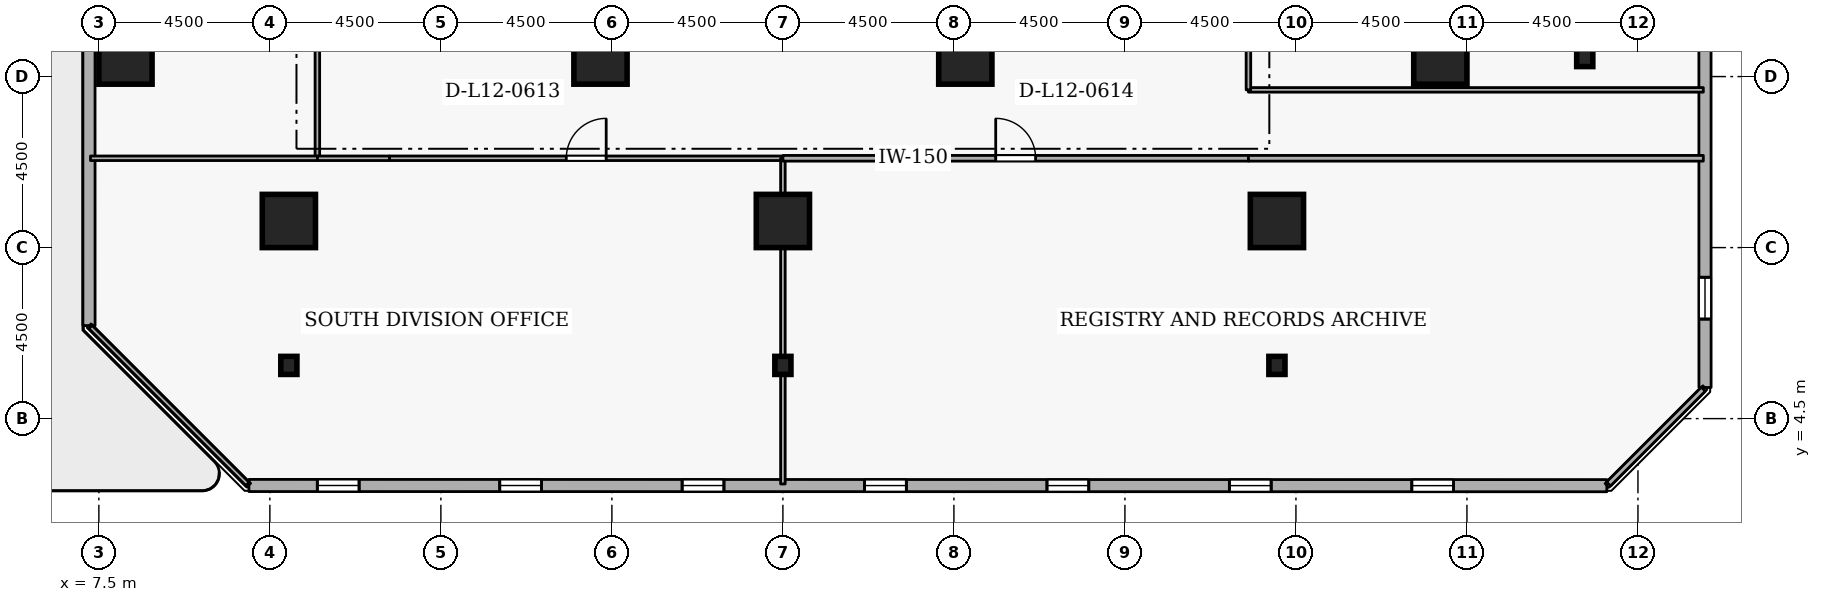
"""IFC4 building model, lengths in metres.
Left out: names, types, materials, properties, quantities, classifications, styles, units other than length and angle.
Written with IfcOpenShell. Run it as: python <this file> out.ifc"""

import sys

from ifc_helpers import new_model, si_unit, direction, frame, frame_2d, origin, origin_2d, place, context, subcontext, project, spatial, rectangle, i_section, extrude, element, fill, save


model = new_model("IFC4")
c1 = context("Model", 3, precision=1e-05, world=origin(), true_north=direction((0.0, 1.0)))
c2 = subcontext(c1, "Body", "Model", "MODEL_VIEW")
j1 = project(units=[si_unit("LENGTHUNIT", "METRE"), si_unit("PLANEANGLEUNIT", "RADIAN")], contexts=[c1])
p1 = place(None, origin())
s1 = spatial("IfcSite", under=j1, at=p1, CompositionType="ELEMENT")
p2 = place(p1, origin())
s2 = spatial("IfcBuilding", under=s1, at=p2, CompositionType="ELEMENT")
p3 = place(p2, frame((0.0, 0.0, 49.5)))
s3 = spatial("IfcBuildingStorey", under=s2, at=p3, CompositionType="ELEMENT", Elevation=49.5)
for number, where, z_axis, x_axis in (
    (1, (12.5, 9.7, 0.0), (0.0, 0.0, 1.0), (1.0, 0.0, 0.0)),
    (2, (25.5, 9.7, 0.0), (0.0, 0.0, 1.0), (1.0, 0.0, 0.0)),
    (3, (38.5, 9.7, 0.0), (0.0, 0.0, 1.0), (1.0, 0.0, 0.0)),
    (4, (42.8, 14.0, 0.0), (0.0, 0.0, 1.0), (1.0, 0.0, 0.0)),
    (5, (8.2, 14.0, 0.0), (0.0, 0.0, 1.0), (1.0, 0.0, 0.0)),
    (6, (20.7, 14.0, 0.0), (0.0, 0.0, 1.0), (1.0, 0.0, 0.0)),
    (7, (30.3, 14.0, 0.0), (0.0, 0.0, 1.0), (1.0, 0.0, 0.0)),
):
    element("IfcColumn", number, at=place(p3, frame(where, z_axis=z_axis, x_axis=x_axis)), inside=s3, PredefinedType="COLUMN", context=c2, shape_type="SweptSolid", body=[
        extrude(rectangle(XDim=1.4, YDim=1.4, at=origin_2d()), origin(), (0.0, 0.0, 1.0), 4.2),
    ])
for number, where, z_axis, x_axis in (
    (8, (12.5, 5.9, 0.0), (0.0, 0.0, 1.0), (1.0, 0.0, 0.0)),
    (9, (25.5, 5.9, 0.0), (0.0, 0.0, 1.0), (1.0, 0.0, 0.0)),
    (10, (38.5, 5.9, 0.0), (0.0, 0.0, 1.0), (1.0, 0.0, 0.0)),
    (11, (46.6, 14.0, 0.0), (0.0, 0.0, 1.0), (1.0, 0.0, 0.0)),
):
    element("IfcColumn", number, at=place(p3, frame(where, z_axis=z_axis, x_axis=x_axis)), inside=s3, PredefinedType="COLUMN", context=c2, shape_type="SweptSolid", body=[
        extrude(i_section(OverallWidth=0.424, OverallDepth=0.475, WebThickness=0.048, FlangeThickness=0.077, FilletRadius=0.015, at=origin_2d()), origin(), (0.0, 0.0, 1.0), 4.2),
    ])
p4 = place(p3, frame((11.448, 2.74, 0.0), z_axis=(0.0, 0.0, 1.0), x_axis=(0.999999988703, -0.000150313265, 0.0)))
e12 = element("IfcWall", 12, at=p4, inside=s3, PredefinedType="STANDARD", context=c2, shape_type="SweptSolid", body=[
    extrude(rectangle(XDim=35.733, YDim=0.32, at=frame_2d((17.866, 0.0))), origin(), (0.0, 0.0, 1.0), 3.3),
])
p5 = place(p4, frame((1.8, 0.0, 0.72)))
e13 = element("IfcOpeningElement", 13, at=p5, cuts=e12, PredefinedType="OPENING", context=c2, shape_type="SweptSolid", body=[
    extrude(rectangle(XDim=1.1, YDim=1.8, at=frame_2d((0.55, 0.9))), frame((0.0, 0.17, 0.0), z_axis=(0.0, -1.0, 0.0), x_axis=(1.0, 0.0, 0.0)), (0.0, 0.0, 1.0), 0.34),
])
p6 = place(p4, frame((6.6, 0.0, 0.72)))
e14 = element("IfcOpeningElement", 14, at=p6, cuts=e12, PredefinedType="OPENING", context=c2, shape_type="SweptSolid", body=[
    extrude(rectangle(XDim=1.1, YDim=1.8, at=frame_2d((0.55, 0.9))), frame((0.0, 0.17, 0.0), z_axis=(0.0, -1.0, 0.0), x_axis=(1.0, 0.0, 0.0)), (0.0, 0.0, 1.0), 0.34),
])
p7 = place(p4, frame((11.4, 0.0, 0.72)))
e15 = element("IfcOpeningElement", 15, at=p7, cuts=e12, PredefinedType="OPENING", context=c2, shape_type="SweptSolid", body=[
    extrude(rectangle(XDim=1.1, YDim=1.8, at=frame_2d((0.55, 0.9))), frame((0.0, 0.17, 0.0), z_axis=(0.0, -1.0, 0.0), x_axis=(1.0, 0.0, 0.0)), (0.0, 0.0, 1.0), 0.34),
])
p8 = place(p4, frame((16.2, 0.0, 0.72)))
e16 = element("IfcOpeningElement", 16, at=p8, cuts=e12, PredefinedType="OPENING", context=c2, shape_type="SweptSolid", body=[
    extrude(rectangle(XDim=1.1, YDim=1.8, at=frame_2d((0.55, 0.9))), frame((0.0, 0.17, 0.0), z_axis=(0.0, -1.0, 0.0), x_axis=(1.0, 0.0, 0.0)), (0.0, 0.0, 1.0), 0.34),
])
p9 = place(p4, frame((21.0, 0.0, 0.72)))
e17 = element("IfcOpeningElement", 17, at=p9, cuts=e12, PredefinedType="OPENING", context=c2, shape_type="SweptSolid", body=[
    extrude(rectangle(XDim=1.1, YDim=1.8, at=frame_2d((0.55, 0.9))), frame((0.0, 0.17, 0.0), z_axis=(0.0, -1.0, 0.0), x_axis=(1.0, 0.0, 0.0)), (0.0, 0.0, 1.0), 0.34),
])
p10 = place(p4, frame((25.8, 0.0, 0.72)))
e18 = element("IfcOpeningElement", 18, at=p10, cuts=e12, PredefinedType="OPENING", context=c2, shape_type="SweptSolid", body=[
    extrude(rectangle(XDim=1.1, YDim=1.8, at=frame_2d((0.55, 0.9))), frame((0.0, 0.17, 0.0), z_axis=(0.0, -1.0, 0.0), x_axis=(1.0, 0.0, 0.0)), (0.0, 0.0, 1.0), 0.34),
])
p11 = place(p4, frame((30.6, 0.0, 0.72)))
e19 = element("IfcOpeningElement", 19, at=p11, cuts=e12, PredefinedType="OPENING", context=c2, shape_type="SweptSolid", body=[
    extrude(rectangle(XDim=1.1, YDim=1.8, at=frame_2d((0.55, 0.9))), frame((0.0, 0.17, 0.0), z_axis=(0.0, -1.0, 0.0), x_axis=(1.0, 0.0, 0.0)), (0.0, 0.0, 1.0), 0.34),
])
p12 = place(p3, frame((49.765, 5.319, 0.0), z_axis=(0.0, 0.0, 1.0), x_axis=(-0.000150313265, 0.999999988703, 0.0)))
e20 = element("IfcWall", 20, at=p12, inside=s3, PredefinedType="STANDARD", context=c2, shape_type="SweptSolid", body=[
    extrude(rectangle(XDim=35.733, YDim=0.32, at=frame_2d((17.866, 0.0))), origin(), (0.0, 0.0, 1.0), 3.3),
])
p13 = place(p12, frame((1.8, 0.0, 0.72)))
e21 = element("IfcOpeningElement", 21, at=p13, cuts=e20, PredefinedType="OPENING", context=c2, shape_type="SweptSolid", body=[
    extrude(rectangle(XDim=1.1, YDim=1.8, at=frame_2d((0.55, 0.9))), frame((0.0, 0.17, 0.0), z_axis=(0.0, -1.0, 0.0), x_axis=(1.0, 0.0, 0.0)), (0.0, 0.0, 1.0), 0.34),
])
p14 = place(p12, frame((11.4, 0.0, 0.72)))
e22 = element("IfcOpeningElement", 22, at=p14, cuts=e20, PredefinedType="OPENING", context=c2, shape_type="SweptSolid", body=[
    extrude(rectangle(XDim=1.1, YDim=1.8, at=frame_2d((0.55, 0.9))), frame((0.0, 0.17, 0.0), z_axis=(0.0, -1.0, 0.0), x_axis=(1.0, 0.0, 0.0)), (0.0, 0.0, 1.0), 0.34),
])
p15 = place(p12, frame((16.2, 0.0, 0.72)))
e23 = element("IfcOpeningElement", 23, at=p15, cuts=e20, PredefinedType="OPENING", context=c2, shape_type="SweptSolid", body=[
    extrude(rectangle(XDim=1.1, YDim=1.8, at=frame_2d((0.55, 0.9))), frame((0.0, 0.17, 0.0), z_axis=(0.0, -1.0, 0.0), x_axis=(1.0, 0.0, 0.0)), (0.0, 0.0, 1.0), 0.34),
])
p16 = place(p12, frame((25.8, 0.0, 0.72)))
e24 = element("IfcOpeningElement", 24, at=p16, cuts=e20, PredefinedType="OPENING", context=c2, shape_type="SweptSolid", body=[
    extrude(rectangle(XDim=1.1, YDim=1.8, at=frame_2d((0.55, 0.9))), frame((0.0, 0.17, 0.0), z_axis=(0.0, -1.0, 0.0), x_axis=(1.0, 0.0, 0.0)), (0.0, 0.0, 1.0), 0.34),
])
p17 = place(p12, frame((30.6, 0.0, 0.72)))
e25 = element("IfcOpeningElement", 25, at=p17, cuts=e20, PredefinedType="OPENING", context=c2, shape_type="SweptSolid", body=[
    extrude(rectangle(XDim=1.1, YDim=1.8, at=frame_2d((0.55, 0.9))), frame((0.0, 0.17, 0.0), z_axis=(0.0, -1.0, 0.0), x_axis=(1.0, 0.0, 0.0)), (0.0, 0.0, 1.0), 0.34),
])
p18 = place(p3, frame((7.235, 42.681, 0.0), z_axis=(0.0, 0.0, 1.0), x_axis=(0.000150313265, -0.999999988703, 0.0)))
e26 = element("IfcWall", 26, at=p18, inside=s3, PredefinedType="STANDARD", context=c2, shape_type="SweptSolid", body=[
    extrude(rectangle(XDim=35.733, YDim=0.32, at=frame_2d((17.866, 0.0))), origin(), (0.0, 0.0, 1.0), 3.3),
])
p19 = place(p18, frame((19.591, 0.0, 0.0)))
e27 = element("IfcOpeningElement", 27, at=p19, cuts=e26, PredefinedType="OPENING", context=c2, shape_type="SweptSolid", body=[
    extrude(rectangle(XDim=1.15, YDim=2.1, at=frame_2d((0.575, 1.05))), frame((0.0, 0.17, 0.0), z_axis=(0.0, -1.0, 0.0), x_axis=(1.0, 0.0, 0.0)), (0.0, 0.0, 1.0), 0.34),
])
p20 = place(p18, frame((6.6, 0.0, 0.72)))
e28 = element("IfcOpeningElement", 28, at=p20, cuts=e26, PredefinedType="OPENING", context=c2, shape_type="SweptSolid", body=[
    extrude(rectangle(XDim=1.1, YDim=1.8, at=frame_2d((0.55, 0.9))), frame((0.0, 0.17, 0.0), z_axis=(0.0, -1.0, 0.0), x_axis=(1.0, 0.0, 0.0)), (0.0, 0.0, 1.0), 0.34),
])
p21 = place(p18, frame((11.4, 0.0, 0.72)))
e29 = element("IfcOpeningElement", 29, at=p21, cuts=e26, PredefinedType="OPENING", context=c2, shape_type="SweptSolid", body=[
    extrude(rectangle(XDim=1.1, YDim=1.8, at=frame_2d((0.55, 0.9))), frame((0.0, 0.17, 0.0), z_axis=(0.0, -1.0, 0.0), x_axis=(1.0, 0.0, 0.0)), (0.0, 0.0, 1.0), 0.34),
])
p22 = place(p18, frame((25.8, 0.0, 0.72)))
e30 = element("IfcOpeningElement", 30, at=p22, cuts=e26, PredefinedType="OPENING", context=c2, shape_type="SweptSolid", body=[
    extrude(rectangle(XDim=1.1, YDim=1.8, at=frame_2d((0.55, 0.9))), frame((0.0, 0.17, 0.0), z_axis=(0.0, -1.0, 0.0), x_axis=(1.0, 0.0, 0.0)), (0.0, 0.0, 1.0), 0.34),
])
p23 = place(p3, frame((13.25, 20.7, 0.0), z_axis=(0.0, 0.0, 1.0), x_axis=(0.0, -1.0, 0.0)))
e31 = element("IfcWall", 31, at=p23, inside=s3, PredefinedType="PARTITIONING", context=c2, shape_type="SweptSolid", body=[
    extrude(rectangle(XDim=9.35, YDim=0.12, at=frame_2d((4.675, 0.0))), origin(), (0.0, 0.0, 1.0), 3.94),
])
p24 = place(p23, frame((4.15, 0.0, 0.0)))
e32 = element("IfcOpeningElement", 32, at=p24, cuts=e31, PredefinedType="OPENING", context=c2, shape_type="SweptSolid", body=[
    extrude(rectangle(XDim=1.05, YDim=2.1, at=frame_2d((0.525, 1.05))), frame((0.0, 0.07, 0.0), z_axis=(0.0, -1.0, 0.0), x_axis=(1.0, 0.0, 0.0)), (0.0, 0.0, 1.0), 0.14),
])
p25 = place(p3, frame((13.25, 11.35, 0.0), z_axis=(0.0, 0.0, 1.0), x_axis=(-1.0, 0.0, 0.0)))
e33 = element("IfcWall", 33, at=p25, inside=s3, PredefinedType="PARTITIONING", context=c2, shape_type="SweptSolid", body=[
    extrude(rectangle(XDim=5.97, YDim=0.12, at=frame_2d((2.985, 0.0))), origin(), (0.0, 0.0, 1.0), 3.94),
])
p26 = place(p3, frame((49.72, 13.15, 0.0), z_axis=(0.0, 0.0, 1.0), x_axis=(-1.0, 0.0, 0.0)))
e34 = element("IfcWall", 34, at=p26, inside=s3, PredefinedType="PARTITIONING", context=c2, shape_type="SweptSolid", body=[
    extrude(rectangle(XDim=11.97, YDim=0.12, at=frame_2d((5.985, 0.0))), origin(), (0.0, 0.0, 1.0), 3.94),
])
p27 = place(p3, frame((37.75, 13.15, 0.0), z_axis=(0.0, 0.0, 1.0), x_axis=(0.0, 1.0, 0.0)))
e35 = element("IfcWall", 35, at=p27, inside=s3, PredefinedType="PARTITIONING", context=c2, shape_type="SweptSolid", body=[
    extrude(rectangle(XDim=1.862, YDim=0.12, at=frame_2d((0.931, 0.0))), origin(), (0.0, 0.0, 1.0), 3.94),
])
p28 = place(p3, frame((13.25, 11.35, 0.0), z_axis=(0.0, 0.0, 1.0), x_axis=(1.0, 0.0, 0.0)))
e36 = element("IfcWall", 36, at=p28, inside=s3, PredefinedType="PARTITIONING", context=c2, shape_type="SweptSolid", body=[
    extrude(rectangle(XDim=1.9, YDim=0.12, at=frame_2d((0.95, 0.0))), origin(), (0.0, 0.0, 1.0), 3.94),
])
p29 = place(p3, frame((15.15, 11.35, 0.0), z_axis=(0.0, 0.0, 1.0), x_axis=(1.0, 0.0, 0.0)))
e37 = element("IfcWall", 37, at=p29, inside=s3, PredefinedType="PARTITIONING", context=c2, shape_type="SweptSolid", body=[
    extrude(rectangle(XDim=10.35, YDim=0.12, at=frame_2d((5.175, 0.0))), origin(), (0.0, 0.0, 1.0), 3.94),
])
p30 = place(p29, frame((4.65, 0.0, 0.0)))
e38 = element("IfcOpeningElement", 38, at=p30, cuts=e37, PredefinedType="OPENING", context=c2, shape_type="SweptSolid", body=[
    extrude(rectangle(XDim=1.05, YDim=2.1, at=frame_2d((0.525, 1.05))), frame((0.0, 0.07, 0.0), z_axis=(0.0, -1.0, 0.0), x_axis=(1.0, 0.0, 0.0)), (0.0, 0.0, 1.0), 0.14),
])
p31 = place(p3, frame((25.5, 11.35, 0.0), z_axis=(0.0, 0.0, 1.0), x_axis=(0.0, -1.0, 0.0)))
e39 = element("IfcWall", 39, at=p31, inside=s3, PredefinedType="PARTITIONING", context=c2, shape_type="SweptSolid", body=[
    extrude(rectangle(XDim=8.57, YDim=0.12, at=frame_2d((4.285, 0.0))), origin(), (0.0, 0.0, 1.0), 3.532),
])
p32 = place(p3, frame((11.411, 2.78, 0.0), z_axis=(0.0, 0.0, 1.0), x_axis=(-0.707106781187, 0.707106781187, 0.0)))
e40 = element("IfcWall", 40, at=p32, inside=s3, PredefinedType="PARTITIONING", context=c2, shape_type="SweptSolid", body=[
    extrude(rectangle(XDim=5.842, YDim=0.12, at=frame_2d((2.921, 0.0))), origin(), (0.0, 0.0, 1.0), 3.94),
])
p33 = place(p3, frame((25.5, 11.35, 0.0), z_axis=(0.0, 0.0, 1.0), x_axis=(1.0, 0.0, 0.0)))
e41 = element("IfcWall", 41, at=p33, inside=s3, PredefinedType="PARTITIONING", context=c2, shape_type="SweptSolid", body=[
    extrude(rectangle(XDim=12.25, YDim=0.15, at=frame_2d((6.125, 0.0))), origin(), (0.0, 0.0, 1.0), 3.94),
])
p34 = place(p33, frame((5.6, 0.0, 0.0)))
e42 = element("IfcOpeningElement", 42, at=p34, cuts=e41, PredefinedType="OPENING", context=c2, shape_type="SweptSolid", body=[
    extrude(rectangle(XDim=1.05, YDim=2.1, at=frame_2d((0.525, 1.05))), frame((0.0, 0.085, 0.0), z_axis=(0.0, -1.0, 0.0), x_axis=(1.0, 0.0, 0.0)), (0.0, 0.0, 1.0), 0.17),
])
p35 = place(p3, frame((37.75, 11.35, 0.0), z_axis=(0.0, 0.0, 1.0), x_axis=(1.0, 0.0, 0.0)))
e43 = element("IfcWall", 43, at=p35, inside=s3, PredefinedType="PARTITIONING", context=c2, shape_type="SweptSolid", body=[
    extrude(rectangle(XDim=11.97, YDim=0.15, at=frame_2d((5.985, 0.0))), origin(), (0.0, 0.0, 1.0), 3.94),
])
p36 = place(p3, frame((49.72, 5.275, 0.0), z_axis=(0.0, 0.0, 1.0), x_axis=(-0.707106781187, -0.707106781187, 0.0)))
e44 = element("IfcWall", 44, at=p36, inside=s3, PredefinedType="PARTITIONING", context=c2, shape_type="SweptSolid", body=[
    extrude(rectangle(XDim=3.528, YDim=0.15, at=frame_2d((1.764, 0.0))), origin(), (0.0, 0.0, 1.0), 3.94),
])
p37 = place(p5, origin())
e45 = element("IfcWindow", 45, at=p37, inside=s3, PartitioningType="SINGLE_PANEL", PredefinedType="WINDOW", context=c2, shape_type="SweptSolid", body=[
    extrude(rectangle(XDim=1.1, YDim=1.8, at=frame_2d((0.55, 0.9))), frame((0.0, 0.03, 0.0), z_axis=(0.0, -1.0, 0.0), x_axis=(1.0, 0.0, 0.0)), (0.0, 0.0, 1.0), 0.06),
])
fill(e13, e45)
p38 = place(p6, origin())
e46 = element("IfcWindow", 46, at=p38, inside=s3, PartitioningType="SINGLE_PANEL", PredefinedType="WINDOW", context=c2, shape_type="SweptSolid", body=[
    extrude(rectangle(XDim=1.1, YDim=1.8, at=frame_2d((0.55, 0.9))), frame((0.0, 0.03, 0.0), z_axis=(0.0, -1.0, 0.0), x_axis=(1.0, 0.0, 0.0)), (0.0, 0.0, 1.0), 0.06),
])
fill(e14, e46)
p39 = place(p7, origin())
e47 = element("IfcWindow", 47, at=p39, inside=s3, PartitioningType="SINGLE_PANEL", PredefinedType="WINDOW", context=c2, shape_type="SweptSolid", body=[
    extrude(rectangle(XDim=1.1, YDim=1.8, at=frame_2d((0.55, 0.9))), frame((0.0, 0.03, 0.0), z_axis=(0.0, -1.0, 0.0), x_axis=(1.0, 0.0, 0.0)), (0.0, 0.0, 1.0), 0.06),
])
fill(e15, e47)
p40 = place(p8, origin())
e48 = element("IfcWindow", 48, at=p40, inside=s3, PartitioningType="SINGLE_PANEL", PredefinedType="WINDOW", context=c2, shape_type="SweptSolid", body=[
    extrude(rectangle(XDim=1.1, YDim=1.8, at=frame_2d((0.55, 0.9))), frame((0.0, 0.03, 0.0), z_axis=(0.0, -1.0, 0.0), x_axis=(1.0, 0.0, 0.0)), (0.0, 0.0, 1.0), 0.06),
])
fill(e16, e48)
p41 = place(p9, origin())
e49 = element("IfcWindow", 49, at=p41, inside=s3, PartitioningType="SINGLE_PANEL", PredefinedType="WINDOW", context=c2, shape_type="SweptSolid", body=[
    extrude(rectangle(XDim=1.1, YDim=1.8, at=frame_2d((0.55, 0.9))), frame((0.0, 0.03, 0.0), z_axis=(0.0, -1.0, 0.0), x_axis=(1.0, 0.0, 0.0)), (0.0, 0.0, 1.0), 0.06),
])
fill(e17, e49)
p42 = place(p10, origin())
e50 = element("IfcWindow", 50, at=p42, inside=s3, PartitioningType="SINGLE_PANEL", PredefinedType="WINDOW", context=c2, shape_type="SweptSolid", body=[
    extrude(rectangle(XDim=1.1, YDim=1.8, at=frame_2d((0.55, 0.9))), frame((0.0, 0.03, 0.0), z_axis=(0.0, -1.0, 0.0), x_axis=(1.0, 0.0, 0.0)), (0.0, 0.0, 1.0), 0.06),
])
fill(e18, e50)
p43 = place(p11, origin())
e51 = element("IfcWindow", 51, at=p43, inside=s3, PartitioningType="SINGLE_PANEL", PredefinedType="WINDOW", context=c2, shape_type="SweptSolid", body=[
    extrude(rectangle(XDim=1.1, YDim=1.8, at=frame_2d((0.55, 0.9))), frame((0.0, 0.03, 0.0), z_axis=(0.0, -1.0, 0.0), x_axis=(1.0, 0.0, 0.0)), (0.0, 0.0, 1.0), 0.06),
])
fill(e19, e51)
p44 = place(p13, origin())
e52 = element("IfcWindow", 52, at=p44, inside=s3, PartitioningType="SINGLE_PANEL", PredefinedType="WINDOW", context=c2, shape_type="SweptSolid", body=[
    extrude(rectangle(XDim=1.1, YDim=1.8, at=frame_2d((0.55, 0.9))), frame((0.0, 0.03, 0.0), z_axis=(0.0, -1.0, 0.0), x_axis=(1.0, 0.0, 0.0)), (0.0, 0.0, 1.0), 0.06),
])
fill(e21, e52)
p45 = place(p30, origin())
e53 = element("IfcDoor", 53, at=p45, inside=s3, OperationType="SINGLE_SWING_RIGHT", PredefinedType="DOOR", context=c2, shape_type="SweptSolid", body=[
    extrude(rectangle(XDim=1.05, YDim=2.1, at=frame_2d((0.525, 1.05))), frame((0.0, 0.025, 0.0), z_axis=(0.0, -1.0, 0.0), x_axis=(1.0, 0.0, 0.0)), (0.0, 0.0, 1.0), 0.05),
])
fill(e38, e53)
p46 = place(p34, origin())
e54 = element("IfcDoor", 54, at=p46, inside=s3, OperationType="SINGLE_SWING_LEFT", PredefinedType="DOOR", context=c2, shape_type="SweptSolid", body=[
    extrude(rectangle(XDim=1.05, YDim=2.1, at=frame_2d((0.525, 1.05))), frame((0.0, 0.025, 0.0), z_axis=(0.0, -1.0, 0.0), x_axis=(1.0, 0.0, 0.0)), (0.0, 0.0, 1.0), 0.05),
])
fill(e42, e54)
save(model, sys.argv[1])
